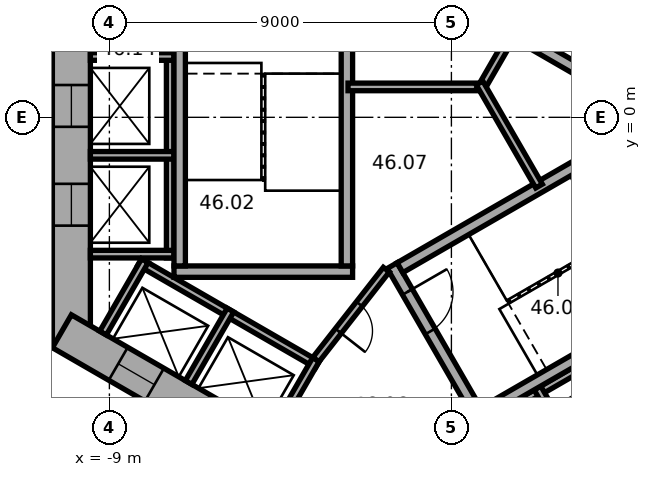
"""IFC4 building model, lengths in metres.
Left out: names, types, materials, properties, quantities, classifications, styles, units other than length and angle.
Written with IfcOpenShell. Run it as: python <this file> out.ifc"""

import sys

from ifc_helpers import new_model, si_unit, direction, frame, frame_2d, origin, place, context, subcontext, project, spatial, rectangle, extrude, element, fill, save


model = new_model("IFC4")
c1 = context("Model", 3, precision=1e-05, world=origin(), true_north=direction((0.0, 1.0)))
c2 = subcontext(c1, "Body", "Model", "MODEL_VIEW")
j1 = project(units=[si_unit("LENGTHUNIT", "METRE"), si_unit("PLANEANGLEUNIT", "RADIAN")], contexts=[c1])
p1 = place(None, origin())
s1 = spatial("IfcSite", under=j1, at=p1, CompositionType="ELEMENT")
p2 = place(p1, origin())
s2 = spatial("IfcBuilding", under=s1, at=p2, CompositionType="ELEMENT")
p3 = place(p2, frame((0.0, 0.0, 187.3)))
s3 = spatial("IfcBuildingStorey", under=s2, at=p3, CompositionType="ELEMENT", Elevation=187.3)
p4 = place(p3, frame((-10.0, 6.062, 0.0), z_axis=(0.0, 0.0, 1.0), x_axis=(0.0, -1.0, 0.0)))
e1 = element("IfcWall", 1, at=p4, inside=s3, PredefinedType="SHEAR", context=c2, shape_type="SweptSolid", body=[
    extrude(rectangle(XDim=12.125, YDim=1.0, at=frame_2d((6.062, 0.0))), origin(), (0.0, 0.0, 1.0), 3.7),
])
p5 = place(p4, frame((5.212, 0.0, 0.0)))
e2 = element("IfcOpeningElement", 2, at=p5, cuts=e1, PredefinedType="OPENING", context=c2, shape_type="SweptSolid", body=[
    extrude(rectangle(XDim=1.1, YDim=2.1, at=frame_2d((0.55, 1.05))), frame((0.0, 0.51, 0.0), z_axis=(0.0, -1.0, 0.0), x_axis=(1.0, 0.0, 0.0)), (0.0, 0.0, 1.0), 1.02),
])
p6 = place(p4, frame((7.812, 0.0, 0.0)))
e3 = element("IfcOpeningElement", 3, at=p6, cuts=e1, PredefinedType="OPENING", context=c2, shape_type="SweptSolid", body=[
    extrude(rectangle(XDim=1.1, YDim=2.1, at=frame_2d((0.55, 1.05))), frame((0.0, 0.51, 0.0), z_axis=(0.0, -1.0, 0.0), x_axis=(1.0, 0.0, 0.0)), (0.0, 0.0, 1.0), 1.02),
])
p7 = place(p3, frame((-10.25, -5.629, 0.0), z_axis=(0.0, 0.0, 1.0), x_axis=(0.866022616891, -0.50000482701, 0.0)))
e4 = element("IfcWall", 4, at=p7, inside=s3, PredefinedType="SHEAR", context=c2, shape_type="SweptSolid", body=[
    extrude(rectangle(XDim=12.125, YDim=1.0, at=frame_2d((6.062, 0.0))), origin(), (0.0, 0.0, 1.0), 3.7),
])
p8 = place(p7, frame((6.262, 0.0, 0.0)))
e5 = element("IfcOpeningElement", 5, at=p8, cuts=e4, PredefinedType="OPENING", context=c2, shape_type="SweptSolid", body=[
    extrude(rectangle(XDim=1.5, YDim=2.1, at=frame_2d((0.75, 1.05))), frame((0.0, 0.51, 0.0), z_axis=(0.0, -1.0, 0.0), x_axis=(1.0, 0.0, 0.0)), (0.0, 0.0, 1.0), 1.02),
])
p9 = place(p7, frame((1.712, 0.0, 0.0)))
e6 = element("IfcOpeningElement", 6, at=p9, cuts=e4, PredefinedType="OPENING", context=c2, shape_type="SweptSolid", body=[
    extrude(rectangle(XDim=1.1, YDim=2.1, at=frame_2d((0.55, 1.05))), frame((0.0, 0.51, 0.0), z_axis=(0.0, -1.0, 0.0), x_axis=(1.0, 0.0, 0.0)), (0.0, 0.0, 1.0), 1.02),
])
p10 = place(p7, frame((4.312, 0.0, 0.0)))
e7 = element("IfcOpeningElement", 7, at=p10, cuts=e4, PredefinedType="OPENING", context=c2, shape_type="SweptSolid", body=[
    extrude(rectangle(XDim=1.1, YDim=2.1, at=frame_2d((0.55, 1.05))), frame((0.0, 0.51, 0.0), z_axis=(0.0, -1.0, 0.0), x_axis=(1.0, 0.0, 0.0)), (0.0, 0.0, 1.0), 1.02),
])
p11 = place(p3, frame((-0.25, -11.691, 0.0), z_axis=(0.0, 0.0, 1.0), x_axis=(0.866022616891, 0.50000482701, 0.0)))
e8 = element("IfcWall", 8, at=p11, inside=s3, PredefinedType="SHEAR", context=c2, shape_type="SweptSolid", body=[
    extrude(rectangle(XDim=12.125, YDim=1.0, at=frame_2d((6.062, 0.0))), origin(), (0.0, 0.0, 1.0), 3.7),
])
p12 = place(p11, frame((2.612, 0.0, 0.0)))
e9 = element("IfcOpeningElement", 9, at=p12, cuts=e8, PredefinedType="OPENING", context=c2, shape_type="SweptSolid", body=[
    extrude(rectangle(XDim=1.1, YDim=2.1, at=frame_2d((0.55, 1.05))), frame((0.0, 0.51, 0.0), z_axis=(0.0, -1.0, 0.0), x_axis=(1.0, 0.0, 0.0)), (0.0, 0.0, 1.0), 1.02),
])
p13 = place(p11, frame((5.212, 0.0, 0.0)))
e10 = element("IfcOpeningElement", 10, at=p13, cuts=e8, PredefinedType="OPENING", context=c2, shape_type="SweptSolid", body=[
    extrude(rectangle(XDim=1.1, YDim=2.1, at=frame_2d((0.55, 1.05))), frame((0.0, 0.51, 0.0), z_axis=(0.0, -1.0, 0.0), x_axis=(1.0, 0.0, 0.0)), (0.0, 0.0, 1.0), 1.02),
])
p14 = place(p11, frame((7.812, 0.0, 0.0)))
e11 = element("IfcOpeningElement", 11, at=p14, cuts=e8, PredefinedType="OPENING", context=c2, shape_type="SweptSolid", body=[
    extrude(rectangle(XDim=1.1, YDim=2.1, at=frame_2d((0.55, 1.05))), frame((0.0, 0.51, 0.0), z_axis=(0.0, -1.0, 0.0), x_axis=(1.0, 0.0, 0.0)), (0.0, 0.0, 1.0), 1.02),
])
p15 = place(p3, frame((-7.4, 4.3, 0.0), z_axis=(0.0, 0.0, 1.0), x_axis=(0.0, -1.0, 0.0)))
e12 = element("IfcWall", 12, at=p15, inside=s3, PredefinedType="PARTITIONING", context=c2, shape_type="SweptSolid", body=[
    extrude(rectangle(XDim=8.0, YDim=0.2, at=frame_2d((4.0, 0.0))), origin(), (0.0, 0.0, 1.0), 3.42),
])
for number, where, z_axis, x_axis in (
    (13, (-7.3, 1.6, 0.0), (0.0, 0.0, 1.0), (-1.0, 0.0, 0.0)),
    (14, (-7.3, -1.0, 0.0), (0.0, 0.0, 1.0), (-1.0, 0.0, 0.0)),
    (15, (-7.3, -3.6, 0.0), (0.0, 0.0, 1.0), (-1.0, 0.0, 0.0)),
):
    element("IfcWall", number, at=place(p3, frame(where, z_axis=z_axis, x_axis=x_axis)), inside=s3, PredefinedType="PARTITIONING", context=c2, shape_type="SweptSolid", body=[
        extrude(rectangle(XDim=2.2, YDim=0.2, at=frame_2d((1.1, 0.0))), origin(), (0.0, 0.0, 1.0), 3.42),
    ])
p16 = place(p3, frame((-8.203, -3.809, 0.0), z_axis=(0.0, 0.0, 1.0), x_axis=(0.866028230842, -0.499995103361, 0.0)))
e16 = element("IfcWall", 16, at=p16, inside=s3, PredefinedType="PARTITIONING", context=c2, shape_type="SweptSolid", body=[
    extrude(rectangle(XDim=5.4, YDim=0.2, at=frame_2d((2.7, 0.0))), origin(), (0.0, 0.0, 1.0), 3.42),
])
for number, where, z_axis, x_axis in (
    (17, (-8.067, -3.772, 0.0), (0.0, 0.0, 1.0), (-0.5, -0.866, 0.0)),
    (18, (-5.815, -5.072, 0.0), (0.0, 0.0, 1.0), (-0.5, -0.866, 0.0)),
):
    element("IfcWall", number, at=place(p3, frame(where, z_axis=z_axis, x_axis=x_axis)), inside=s3, PredefinedType="PARTITIONING", context=c2, shape_type="SweptSolid", body=[
        extrude(rectangle(XDim=2.2, YDim=0.2, at=frame_2d((1.1, 0.0))), origin(), (0.0, 0.0, 1.0), 3.42),
    ])
p17 = place(p3, frame((-3.563, -6.372, 0.0), z_axis=(0.0, 0.0, 1.0), x_axis=(-0.499994660107, -0.866028486751, 0.0)))
e19 = element("IfcWall", 19, at=p17, inside=s3, PredefinedType="PARTITIONING", context=c2, shape_type="SweptSolid", body=[
    extrude(rectangle(XDim=2.2, YDim=0.2, at=frame_2d((1.1, 0.0))), origin(), (0.0, 0.0, 1.0), 3.42),
])
p18 = place(p3, frame((-0.024, -8.559, 0.0), z_axis=(0.0, 0.0, 1.0), x_axis=(0.866026010844, 0.49999894854, 0.0)))
e20 = element("IfcWall", 20, at=p18, inside=s3, PredefinedType="PARTITIONING", context=c2, shape_type="SweptSolid", body=[
    extrude(rectangle(XDim=8.0, YDim=0.2, at=frame_2d((4.0, 0.0))), origin(), (0.0, 0.0, 1.0), 3.42),
])
p19 = place(p3, frame((2.264, -7.122, 0.0), z_axis=(0.0, 0.0, 1.0), x_axis=(0.500077893725, -0.86598042715, 0.0)))
e21 = element("IfcWall", 21, at=p19, inside=s3, PredefinedType="PARTITIONING", context=c2, shape_type="SweptSolid", body=[
    extrude(rectangle(XDim=2.2, YDim=0.2, at=frame_2d((1.1, 0.0))), origin(), (0.0, 0.0, 1.0), 3.42),
])
p20 = place(p3, frame((4.103, 0.807, 0.0), z_axis=(0.0, 0.0, 1.0), x_axis=(-0.866027801685, 0.499995846692, 0.0)))
e22 = element("IfcWall", 22, at=p20, inside=s3, PredefinedType="SHEAR", context=c2, shape_type="SweptSolid", body=[
    extrude(rectangle(XDim=7.06, YDim=0.3, at=frame_2d((3.53, 0.0))), origin(), (0.0, 0.0, 1.0), 3.42),
])
p21 = place(p3, frame((-2.6, -4.06, 0.0), z_axis=(0.0, 0.0, 1.0), x_axis=(-1.0, 0.0, 0.0)))
e23 = element("IfcWall", 23, at=p21, inside=s3, PredefinedType="SHEAR", context=c2, shape_type="SweptSolid", body=[
    extrude(rectangle(XDim=4.7, YDim=0.3, at=frame_2d((2.35, 0.0))), origin(), (0.0, 0.0, 1.0), 3.42),
])
for number, where, z_axis, x_axis in (
    (24, (-2.75, 3.15, 0.0), (0.0, 0.0, 1.0), (0.0, -1.0, 0.0)),
    (25, (-7.15, 3.15, 0.0), (0.0, 0.0, 1.0), (0.0, -1.0, 0.0)),
):
    element("IfcWall", number, at=place(p3, frame(where, z_axis=z_axis, x_axis=x_axis)), inside=s3, PredefinedType="SHEAR", context=c2, shape_type="SweptSolid", body=[
        extrude(rectangle(XDim=7.06, YDim=0.3, at=frame_2d((3.53, 0.0))), origin(), (0.0, 0.0, 1.0), 3.42),
    ])
p22 = place(p3, frame((-1.558, -3.902, 0.0), z_axis=(0.0, 0.0, 1.0), x_axis=(0.499977259774, -0.866038532462, 0.0)))
e26 = element("IfcWall", 26, at=p22, inside=s3, PredefinedType="SHEAR", context=c2, shape_type="SweptSolid", body=[
    extrude(rectangle(XDim=4.7, YDim=0.3, at=frame_2d((2.35, 0.0))), origin(), (0.0, 0.0, 1.0), 3.42),
])
p23 = place(p22, frame((0.8, 0.0, 0.0)))
e27 = element("IfcOpeningElement", 27, at=p23, cuts=e26, PredefinedType="OPENING", context=c2, shape_type="SweptSolid", body=[
    extrude(rectangle(XDim=1.2, YDim=2.1, at=frame_2d((0.6, 1.05))), frame((0.0, 0.16, 0.0), z_axis=(0.0, -1.0, 0.0), x_axis=(1.0, 0.0, 0.0)), (0.0, 0.0, 1.0), 0.32),
])
for number, where, z_axis, x_axis in (
    (28, (-1.353, -3.957, 0.0), (0.0, 0.0, 1.0), (0.866, 0.5, 0.0)),
    (29, (0.847, -7.767, 0.0), (0.0, 0.0, 1.0), (0.866, 0.5, 0.0)),
):
    element("IfcWall", number, at=place(p3, frame(where, z_axis=z_axis, x_axis=x_axis)), inside=s3, PredefinedType="SHEAR", context=c2, shape_type="SweptSolid", body=[
        extrude(rectangle(XDim=7.06, YDim=0.3, at=frame_2d((3.53, 0.0))), origin(), (0.0, 0.0, 1.0), 3.42),
    ])
p24 = place(p3, frame((-1.712, -4.008, 0.0), z_axis=(0.0, 0.0, 1.0), x_axis=(-0.616549420702, -0.787316208287, 0.0)))
e30 = element("IfcWall", 30, at=p24, inside=s3, PredefinedType="PARTITIONING", context=c2, shape_type="SweptSolid", body=[
    extrude(rectangle(XDim=3.002, YDim=0.2, at=frame_2d((1.501, 0.0))), origin(), (0.0, 0.0, 1.0), 3.42),
])
p25 = place(p24, frame((1.15, 0.0, 0.0)))
e31 = element("IfcOpeningElement", 31, at=p25, cuts=e30, PredefinedType="OPENING", context=c2, shape_type="SweptSolid", body=[
    extrude(rectangle(XDim=0.9, YDim=2.1, at=frame_2d((0.45, 1.05))), frame((0.0, 0.11, 0.0), z_axis=(0.0, -1.0, 0.0), x_axis=(1.0, 0.0, 0.0)), (0.0, 0.0, 1.0), 0.22),
])
p26 = place(p3, frame((0.92, 0.8, 0.0), z_axis=(0.0, 0.0, 1.0), x_axis=(-1.0, 0.0, 0.0)))
e32 = element("IfcWall", 32, at=p26, inside=s3, PredefinedType="PARTITIONING", context=c2, shape_type="SweptSolid", body=[
    extrude(rectangle(XDim=3.64, YDim=0.2, at=frame_2d((1.82, 0.0))), origin(), (0.0, 0.0, 1.0), 3.42),
])
p27 = place(p3, frame((0.74, 0.696, 0.0), z_axis=(0.0, 0.0, 1.0), x_axis=(0.499956301907, 0.86605063142, 0.0)))
e33 = element("IfcWall", 33, at=p27, inside=s3, PredefinedType="PARTITIONING", context=c2, shape_type="SweptSolid", body=[
    extrude(rectangle(XDim=1.747, YDim=0.2, at=frame_2d((0.874, 0.0))), origin(), (0.0, 0.0, 1.0), 3.42),
])
p28 = place(p3, frame((0.74, 0.904, 0.0), z_axis=(0.0, 0.0, 1.0), x_axis=(0.500028278809, -0.866009076391, 0.0)))
e34 = element("IfcWall", 34, at=p28, inside=s3, PredefinedType="PARTITIONING", context=c2, shape_type="SweptSolid", body=[
    extrude(rectangle(XDim=3.133, YDim=0.2, at=frame_2d((1.566, 0.0))), origin(), (0.0, 0.0, 1.0), 3.42),
])
p29 = place(p23, origin())
e35 = element("IfcDoor", 35, at=p29, inside=s3, OperationType="SINGLE_SWING_RIGHT", PredefinedType="DOOR", context=c2, shape_type="SweptSolid", body=[
    extrude(rectangle(XDim=1.2, YDim=2.1, at=frame_2d((0.6, 1.05))), frame((0.0, 0.025, 0.0), z_axis=(0.0, -1.0, 0.0), x_axis=(1.0, 0.0, 0.0)), (0.0, 0.0, 1.0), 0.05),
])
fill(e27, e35)
p30 = place(p25, origin())
e36 = element("IfcDoor", 36, at=p30, inside=s3, OperationType="SINGLE_SWING_LEFT", PredefinedType="DOOR", context=c2, shape_type="SweptSolid", body=[
    extrude(rectangle(XDim=0.9, YDim=2.1, at=frame_2d((0.45, 1.05))), frame((0.0, 0.025, 0.0), z_axis=(0.0, -1.0, 0.0), x_axis=(1.0, 0.0, 0.0)), (0.0, 0.0, 1.0), 0.05),
])
fill(e31, e36)
p31 = place(p5, origin())
e37 = element("IfcDoor", 37, at=p31, inside=s3, OperationType="DOUBLE_DOOR_SLIDING", PredefinedType="DOOR", context=c2, shape_type="SweptSolid", body=[
    extrude(rectangle(XDim=1.1, YDim=2.1, at=frame_2d((0.55, 1.05))), frame((0.0, 0.025, 0.0), z_axis=(0.0, -1.0, 0.0), x_axis=(1.0, 0.0, 0.0)), (0.0, 0.0, 1.0), 0.05),
])
fill(e2, e37)
p32 = place(p6, origin())
e38 = element("IfcDoor", 38, at=p32, inside=s3, OperationType="DOUBLE_DOOR_SLIDING", PredefinedType="DOOR", context=c2, shape_type="SweptSolid", body=[
    extrude(rectangle(XDim=1.1, YDim=2.1, at=frame_2d((0.55, 1.05))), frame((0.0, 0.025, 0.0), z_axis=(0.0, -1.0, 0.0), x_axis=(1.0, 0.0, 0.0)), (0.0, 0.0, 1.0), 0.05),
])
fill(e3, e38)
p33 = place(p9, origin())
e39 = element("IfcDoor", 39, at=p33, inside=s3, OperationType="DOUBLE_DOOR_SLIDING", PredefinedType="DOOR", context=c2, shape_type="SweptSolid", body=[
    extrude(rectangle(XDim=1.1, YDim=2.1, at=frame_2d((0.55, 1.05))), frame((0.0, 0.025, 0.0), z_axis=(0.0, -1.0, 0.0), x_axis=(1.0, 0.0, 0.0)), (0.0, 0.0, 1.0), 0.05),
])
fill(e6, e39)
save(model, sys.argv[1])
